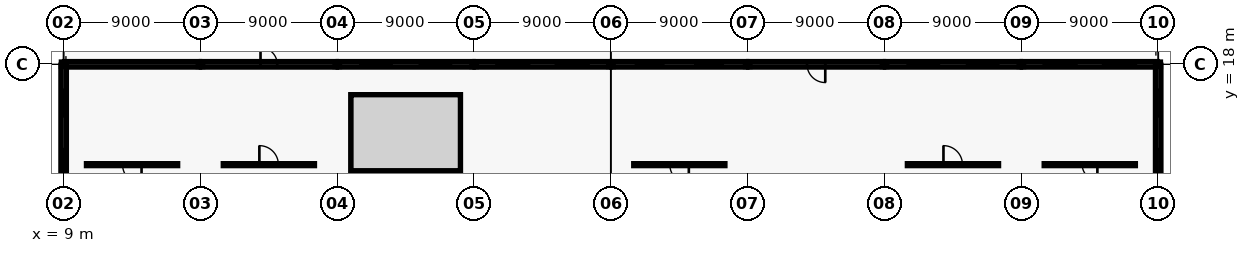
"""IFC4 building model, lengths in metres.
Left out: names, types, materials, properties, quantities, classifications, styles, units other than length and angle.
Written with IfcOpenShell. Run it as: python <this file> out.ifc"""

import sys

from ifc_helpers import new_model, si_unit, direction, frame, frame_2d, origin, origin_2d, place, context, subcontext, project, spatial, rectangle, i_section, extrude, element, fill, save


model = new_model("IFC4")
c1 = context("Model", 3, precision=1e-05, world=origin(), true_north=direction((0.0, 1.0)))
c2 = subcontext(c1, "Body", "Model", "MODEL_VIEW")
j1 = project(units=[si_unit("LENGTHUNIT", "METRE"), si_unit("PLANEANGLEUNIT", "RADIAN")], contexts=[c1])
p1 = place(None, origin())
s1 = spatial("IfcSite", under=j1, at=p1, CompositionType="ELEMENT")
p2 = place(p1, origin())
s2 = spatial("IfcBuilding", under=s1, at=p2, CompositionType="ELEMENT")
p3 = place(p2, frame((0.0, 0.0, 9.6)))
s3 = spatial("IfcBuildingStorey", under=s2, at=p3, CompositionType="ELEMENT", Elevation=9.6)
for number, where, z_axis, x_axis in (
    (1, (9.0, 18.0, 0.0), (0.0, 0.0, 1.0), (1.0, 0.0, 0.0)),
    (2, (18.0, 18.0, 0.0), (0.0, 0.0, 1.0), (1.0, 0.0, 0.0)),
    (3, (27.0, 18.0, 0.0), (0.0, 0.0, 1.0), (1.0, 0.0, 0.0)),
    (4, (36.0, 18.0, 0.0), (0.0, 0.0, 1.0), (1.0, 0.0, 0.0)),
    (5, (45.0, 18.0, 0.0), (0.0, 0.0, 1.0), (1.0, 0.0, 0.0)),
    (6, (54.0, 18.0, 0.0), (0.0, 0.0, 1.0), (1.0, 0.0, 0.0)),
    (7, (63.0, 18.0, 0.0), (0.0, 0.0, 1.0), (1.0, 0.0, 0.0)),
    (8, (72.0, 18.0, 0.0), (0.0, 0.0, 1.0), (1.0, 0.0, 0.0)),
    (9, (81.0, 18.0, 0.0), (0.0, 0.0, 1.0), (1.0, 0.0, 0.0)),
):
    element("IfcColumn", number, at=place(p3, frame(where, z_axis=z_axis, x_axis=x_axis)), inside=s3, PredefinedType="COLUMN", context=c2, shape_type="SweptSolid", body=[
        extrude(i_section(OverallWidth=0.3, OverallDepth=0.3, WebThickness=0.011, FlangeThickness=0.019, FilletRadius=0.027, at=origin_2d()), origin(), (0.0, 0.0, 1.0), 3.9),
    ])
p4 = place(p3, frame((9.06, 18.0, 0.0), z_axis=(0.0, 0.0, 1.0), x_axis=(1.0, 0.0, 0.0)))
e10 = element("IfcWall", 10, at=p4, inside=s3, PredefinedType="SOLIDWALL", context=c2, shape_type="SweptSolid", body=[
    extrude(rectangle(XDim=8.88, YDim=0.36, at=frame_2d((4.44, 0.0))), origin(), (0.0, 0.0, 1.0), 3.25),
])
p5 = place(p3, frame((18.06, 18.0, 0.0), z_axis=(0.0, 0.0, 1.0), x_axis=(1.0, 0.0, 0.0)))
e11 = element("IfcWall", 11, at=p5, inside=s3, PredefinedType="SOLIDWALL", context=c2, shape_type="SweptSolid", body=[
    extrude(rectangle(XDim=8.88, YDim=0.36, at=frame_2d((4.44, 0.0))), origin(), (0.0, 0.0, 1.0), 3.25),
])
p6 = place(p5, frame((3.89, 0.0, 0.0)))
e12 = element("IfcOpeningElement", 12, at=p6, cuts=e11, PredefinedType="OPENING", context=c2, shape_type="SweptSolid", body=[
    extrude(rectangle(XDim=1.1, YDim=2.15, at=frame_2d((0.55, 1.075))), frame((0.0, 0.19, 0.0), z_axis=(0.0, -1.0, 0.0), x_axis=(1.0, 0.0, 0.0)), (0.0, 0.0, 1.0), 0.38),
])
p7 = place(p3, frame((27.06, 18.0, 0.0), z_axis=(0.0, 0.0, 1.0), x_axis=(1.0, 0.0, 0.0)))
e13 = element("IfcWall", 13, at=p7, inside=s3, PredefinedType="SOLIDWALL", context=c2, shape_type="SweptSolid", body=[
    extrude(rectangle(XDim=8.88, YDim=0.36, at=frame_2d((4.44, 0.0))), origin(), (0.0, 0.0, 1.0), 3.25),
])
p8 = place(p7, frame((1.461, 0.0, 0.9)))
e14 = element("IfcOpeningElement", 14, at=p8, cuts=e13, PredefinedType="OPENING", context=c2, shape_type="SweptSolid", body=[
    extrude(rectangle(XDim=2.05, YDim=1.9, at=frame_2d((1.025, 0.95))), frame((0.0, 0.19, 0.0), z_axis=(0.0, -1.0, 0.0), x_axis=(1.0, 0.0, 0.0)), (0.0, 0.0, 1.0), 0.38),
])
p9 = place(p7, frame((5.369, 0.0, 0.9)))
e15 = element("IfcOpeningElement", 15, at=p9, cuts=e13, PredefinedType="OPENING", context=c2, shape_type="SweptSolid", body=[
    extrude(rectangle(XDim=2.05, YDim=1.9, at=frame_2d((1.025, 0.95))), frame((0.0, 0.19, 0.0), z_axis=(0.0, -1.0, 0.0), x_axis=(1.0, 0.0, 0.0)), (0.0, 0.0, 1.0), 0.38),
])
p10 = place(p3, frame((36.06, 18.0, 0.0), z_axis=(0.0, 0.0, 1.0), x_axis=(1.0, 0.0, 0.0)))
e16 = element("IfcWall", 16, at=p10, inside=s3, PredefinedType="SOLIDWALL", context=c2, shape_type="SweptSolid", body=[
    extrude(rectangle(XDim=8.88, YDim=0.36, at=frame_2d((4.44, 0.0))), origin(), (0.0, 0.0, 1.0), 3.25),
])
p11 = place(p10, frame((1.411, 0.0, 0.9)))
e17 = element("IfcOpeningElement", 17, at=p11, cuts=e16, PredefinedType="OPENING", context=c2, shape_type="SweptSolid", body=[
    extrude(rectangle(XDim=2.15, YDim=1.75, at=frame_2d((1.075, 0.875))), frame((0.0, 0.19, 0.0), z_axis=(0.0, -1.0, 0.0), x_axis=(1.0, 0.0, 0.0)), (0.0, 0.0, 1.0), 0.38),
])
p12 = place(p10, frame((5.319, 0.0, 0.9)))
e18 = element("IfcOpeningElement", 18, at=p12, cuts=e16, PredefinedType="OPENING", context=c2, shape_type="SweptSolid", body=[
    extrude(rectangle(XDim=2.15, YDim=1.75, at=frame_2d((1.075, 0.875))), frame((0.0, 0.19, 0.0), z_axis=(0.0, -1.0, 0.0), x_axis=(1.0, 0.0, 0.0)), (0.0, 0.0, 1.0), 0.38),
])
p13 = place(p3, frame((45.06, 18.0, 0.0), z_axis=(0.0, 0.0, 1.0), x_axis=(1.0, 0.0, 0.0)))
e19 = element("IfcWall", 19, at=p13, inside=s3, PredefinedType="SOLIDWALL", context=c2, shape_type="SweptSolid", body=[
    extrude(rectangle(XDim=8.88, YDim=0.36, at=frame_2d((4.44, 0.0))), origin(), (0.0, 0.0, 1.0), 3.25),
])
p14 = place(p13, frame((1.586, 0.0, 0.9)))
e20 = element("IfcOpeningElement", 20, at=p14, cuts=e19, PredefinedType="OPENING", context=c2, shape_type="SweptSolid", body=[
    extrude(rectangle(XDim=1.8, YDim=1.8, at=frame_2d((0.9, 0.9))), frame((0.0, 0.19, 0.0), z_axis=(0.0, -1.0, 0.0), x_axis=(1.0, 0.0, 0.0)), (0.0, 0.0, 1.0), 0.38),
])
p15 = place(p13, frame((5.494, 0.0, 0.9)))
e21 = element("IfcOpeningElement", 21, at=p15, cuts=e19, PredefinedType="OPENING", context=c2, shape_type="SweptSolid", body=[
    extrude(rectangle(XDim=1.8, YDim=1.8, at=frame_2d((0.9, 0.9))), frame((0.0, 0.19, 0.0), z_axis=(0.0, -1.0, 0.0), x_axis=(1.0, 0.0, 0.0)), (0.0, 0.0, 1.0), 0.38),
])
p16 = place(p3, frame((54.06, 18.0, 0.0), z_axis=(0.0, 0.0, 1.0), x_axis=(1.0, 0.0, 0.0)))
e22 = element("IfcWall", 22, at=p16, inside=s3, PredefinedType="SOLIDWALL", context=c2, shape_type="SweptSolid", body=[
    extrude(rectangle(XDim=8.88, YDim=0.36, at=frame_2d((4.44, 0.0))), origin(), (0.0, 0.0, 1.0), 3.25),
])
p17 = place(p16, frame((3.84, 0.0, 0.0)))
e23 = element("IfcOpeningElement", 23, at=p17, cuts=e22, PredefinedType="OPENING", context=c2, shape_type="SweptSolid", body=[
    extrude(rectangle(XDim=1.2, YDim=2.15, at=frame_2d((0.6, 1.075))), frame((0.0, 0.19, 0.0), z_axis=(0.0, -1.0, 0.0), x_axis=(1.0, 0.0, 0.0)), (0.0, 0.0, 1.0), 0.38),
])
p18 = place(p3, frame((63.06, 18.0, 0.0), z_axis=(0.0, 0.0, 1.0), x_axis=(1.0, 0.0, 0.0)))
e24 = element("IfcWall", 24, at=p18, inside=s3, PredefinedType="SOLIDWALL", context=c2, shape_type="SweptSolid", body=[
    extrude(rectangle(XDim=8.88, YDim=0.36, at=frame_2d((4.44, 0.0))), origin(), (0.0, 0.0, 1.0), 3.25),
])
p19 = place(p18, frame((1.461, 0.0, 0.9)))
e25 = element("IfcOpeningElement", 25, at=p19, cuts=e24, PredefinedType="OPENING", context=c2, shape_type="SweptSolid", body=[
    extrude(rectangle(XDim=2.05, YDim=1.9, at=frame_2d((1.025, 0.95))), frame((0.0, 0.19, 0.0), z_axis=(0.0, -1.0, 0.0), x_axis=(1.0, 0.0, 0.0)), (0.0, 0.0, 1.0), 0.38),
])
p20 = place(p18, frame((5.369, 0.0, 0.9)))
e26 = element("IfcOpeningElement", 26, at=p20, cuts=e24, PredefinedType="OPENING", context=c2, shape_type="SweptSolid", body=[
    extrude(rectangle(XDim=2.05, YDim=1.9, at=frame_2d((1.025, 0.95))), frame((0.0, 0.19, 0.0), z_axis=(0.0, -1.0, 0.0), x_axis=(1.0, 0.0, 0.0)), (0.0, 0.0, 1.0), 0.38),
])
p21 = place(p3, frame((72.06, 18.0, 0.0), z_axis=(0.0, 0.0, 1.0), x_axis=(1.0, 0.0, 0.0)))
e27 = element("IfcWall", 27, at=p21, inside=s3, PredefinedType="SOLIDWALL", context=c2, shape_type="SweptSolid", body=[
    extrude(rectangle(XDim=8.88, YDim=0.36, at=frame_2d((4.44, 0.0))), origin(), (0.0, 0.0, 1.0), 3.25),
])
p22 = place(p21, frame((1.411, 0.0, 0.9)))
e28 = element("IfcOpeningElement", 28, at=p22, cuts=e27, PredefinedType="OPENING", context=c2, shape_type="SweptSolid", body=[
    extrude(rectangle(XDim=2.15, YDim=1.75, at=frame_2d((1.075, 0.875))), frame((0.0, 0.19, 0.0), z_axis=(0.0, -1.0, 0.0), x_axis=(1.0, 0.0, 0.0)), (0.0, 0.0, 1.0), 0.38),
])
p23 = place(p21, frame((5.319, 0.0, 0.9)))
e29 = element("IfcOpeningElement", 29, at=p23, cuts=e27, PredefinedType="OPENING", context=c2, shape_type="SweptSolid", body=[
    extrude(rectangle(XDim=2.15, YDim=1.75, at=frame_2d((1.075, 0.875))), frame((0.0, 0.19, 0.0), z_axis=(0.0, -1.0, 0.0), x_axis=(1.0, 0.0, 0.0)), (0.0, 0.0, 1.0), 0.38),
])
p24 = place(p3, frame((9.0, 9.06, 0.0), z_axis=(0.0, 0.0, 1.0), x_axis=(0.0, 1.0, 0.0)))
e30 = element("IfcWall", 30, at=p24, inside=s3, PredefinedType="SOLIDWALL", context=c2, shape_type="SweptSolid", body=[
    extrude(rectangle(XDim=8.88, YDim=0.36, at=frame_2d((4.44, 0.0))), origin(), (0.0, 0.0, 1.0), 3.25),
])
p25 = place(p24, frame((1.611, 0.0, 0.9)))
e31 = element("IfcOpeningElement", 31, at=p25, cuts=e30, PredefinedType="OPENING", context=c2, shape_type="SweptSolid", body=[
    extrude(rectangle(XDim=1.75, YDim=2.25, at=frame_2d((0.875, 1.125))), frame((0.0, 0.19, 0.0), z_axis=(0.0, -1.0, 0.0), x_axis=(1.0, 0.0, 0.0)), (0.0, 0.0, 1.0), 0.38),
])
p26 = place(p24, frame((5.519, 0.0, 0.9)))
e32 = element("IfcOpeningElement", 32, at=p26, cuts=e30, PredefinedType="OPENING", context=c2, shape_type="SweptSolid", body=[
    extrude(rectangle(XDim=1.75, YDim=2.25, at=frame_2d((0.875, 1.125))), frame((0.0, 0.19, 0.0), z_axis=(0.0, -1.0, 0.0), x_axis=(1.0, 0.0, 0.0)), (0.0, 0.0, 1.0), 0.38),
])
p27 = place(p3, frame((81.0, 9.06, 0.0), z_axis=(0.0, 0.0, 1.0), x_axis=(0.0, 1.0, 0.0)))
e33 = element("IfcWall", 33, at=p27, inside=s3, PredefinedType="SOLIDWALL", context=c2, shape_type="SweptSolid", body=[
    extrude(rectangle(XDim=8.88, YDim=0.36, at=frame_2d((4.44, 0.0))), origin(), (0.0, 0.0, 1.0), 3.25),
])
p28 = place(p27, frame((1.611, 0.0, 0.9)))
e34 = element("IfcOpeningElement", 34, at=p28, cuts=e33, PredefinedType="OPENING", context=c2, shape_type="SweptSolid", body=[
    extrude(rectangle(XDim=1.75, YDim=2.25, at=frame_2d((0.875, 1.125))), frame((0.0, 0.19, 0.0), z_axis=(0.0, -1.0, 0.0), x_axis=(1.0, 0.0, 0.0)), (0.0, 0.0, 1.0), 0.38),
])
p29 = place(p27, frame((5.519, 0.0, 0.9)))
e35 = element("IfcOpeningElement", 35, at=p29, cuts=e33, PredefinedType="OPENING", context=c2, shape_type="SweptSolid", body=[
    extrude(rectangle(XDim=1.75, YDim=2.25, at=frame_2d((0.875, 1.125))), frame((0.0, 0.19, 0.0), z_axis=(0.0, -1.0, 0.0), x_axis=(1.0, 0.0, 0.0)), (0.0, 0.0, 1.0), 0.38),
])
p30 = place(p3, frame((10.5, 11.4, 0.0), z_axis=(0.0, 0.0, 1.0), x_axis=(1.0, 0.0, 0.0)))
e36 = element("IfcWall", 36, at=p30, inside=s3, PredefinedType="PARTITIONING", context=c2, shape_type="SweptSolid", body=[
    extrude(rectangle(XDim=6.0, YDim=0.13, at=frame_2d((3.0, 0.0))), origin(), (0.0, 0.0, 1.0), 2.9),
])
p31 = place(p30, frame((2.375, 0.0, 0.0)))
e37 = element("IfcOpeningElement", 37, at=p31, cuts=e36, PredefinedType="OPENING", context=c2, shape_type="SweptSolid", body=[
    extrude(rectangle(XDim=1.25, YDim=2.15, at=frame_2d((0.625, 1.075))), frame((0.0, 0.075, 0.0), z_axis=(0.0, -1.0, 0.0), x_axis=(1.0, 0.0, 0.0)), (0.0, 0.0, 1.0), 0.15),
])
p32 = place(p3, frame((19.5, 11.4, 0.0), z_axis=(0.0, 0.0, 1.0), x_axis=(1.0, 0.0, 0.0)))
e38 = element("IfcWall", 38, at=p32, inside=s3, PredefinedType="PARTITIONING", context=c2, shape_type="SweptSolid", body=[
    extrude(rectangle(XDim=6.0, YDim=0.13, at=frame_2d((3.0, 0.0))), origin(), (0.0, 0.0, 1.0), 2.9),
])
p33 = place(p32, frame((2.375, 0.0, 0.0)))
e39 = element("IfcOpeningElement", 39, at=p33, cuts=e38, PredefinedType="OPENING", context=c2, shape_type="SweptSolid", body=[
    extrude(rectangle(XDim=1.25, YDim=2.15, at=frame_2d((0.625, 1.075))), frame((0.0, 0.075, 0.0), z_axis=(0.0, -1.0, 0.0), x_axis=(1.0, 0.0, 0.0)), (0.0, 0.0, 1.0), 0.15),
])
p34 = place(p3, frame((46.5, 11.4, 0.0), z_axis=(0.0, 0.0, 1.0), x_axis=(1.0, 0.0, 0.0)))
e40 = element("IfcWall", 40, at=p34, inside=s3, PredefinedType="PARTITIONING", context=c2, shape_type="SweptSolid", body=[
    extrude(rectangle(XDim=6.0, YDim=0.13, at=frame_2d((3.0, 0.0))), origin(), (0.0, 0.0, 1.0), 2.9),
])
p35 = place(p34, frame((2.375, 0.0, 0.0)))
e41 = element("IfcOpeningElement", 41, at=p35, cuts=e40, PredefinedType="OPENING", context=c2, shape_type="SweptSolid", body=[
    extrude(rectangle(XDim=1.25, YDim=2.15, at=frame_2d((0.625, 1.075))), frame((0.0, 0.075, 0.0), z_axis=(0.0, -1.0, 0.0), x_axis=(1.0, 0.0, 0.0)), (0.0, 0.0, 1.0), 0.15),
])
p36 = place(p3, frame((64.5, 11.4, 0.0), z_axis=(0.0, 0.0, 1.0), x_axis=(1.0, 0.0, 0.0)))
e42 = element("IfcWall", 42, at=p36, inside=s3, PredefinedType="PARTITIONING", context=c2, shape_type="SweptSolid", body=[
    extrude(rectangle(XDim=6.0, YDim=0.13, at=frame_2d((3.0, 0.0))), origin(), (0.0, 0.0, 1.0), 2.9),
])
p37 = place(p36, frame((2.375, 0.0, 0.0)))
e43 = element("IfcOpeningElement", 43, at=p37, cuts=e42, PredefinedType="OPENING", context=c2, shape_type="SweptSolid", body=[
    extrude(rectangle(XDim=1.25, YDim=2.15, at=frame_2d((0.625, 1.075))), frame((0.0, 0.075, 0.0), z_axis=(0.0, -1.0, 0.0), x_axis=(1.0, 0.0, 0.0)), (0.0, 0.0, 1.0), 0.15),
])
p38 = place(p3, frame((73.5, 11.4, 0.0), z_axis=(0.0, 0.0, 1.0), x_axis=(1.0, 0.0, 0.0)))
e44 = element("IfcWall", 44, at=p38, inside=s3, PredefinedType="PARTITIONING", context=c2, shape_type="SweptSolid", body=[
    extrude(rectangle(XDim=6.0, YDim=0.13, at=frame_2d((3.0, 0.0))), origin(), (0.0, 0.0, 1.0), 2.9),
])
p39 = place(p38, frame((2.5, 0.0, 0.0)))
e45 = element("IfcOpeningElement", 45, at=p39, cuts=e44, PredefinedType="OPENING", context=c2, shape_type="SweptSolid", body=[
    extrude(rectangle(XDim=1.0, YDim=2.1, at=frame_2d((0.5, 1.05))), frame((0.0, 0.075, 0.0), z_axis=(0.0, -1.0, 0.0), x_axis=(1.0, 0.0, 0.0)), (0.0, 0.0, 1.0), 0.15),
])
p40 = place(p6, origin())
e46 = element("IfcDoor", 46, at=p40, inside=s3, OperationType="SINGLE_SWING_LEFT", PredefinedType="DOOR", context=c2, shape_type="SweptSolid", body=[
    extrude(rectangle(XDim=1.1, YDim=2.15, at=frame_2d((0.55, 1.075))), frame((0.0, 0.025, 0.0), z_axis=(0.0, -1.0, 0.0), x_axis=(1.0, 0.0, 0.0)), (0.0, 0.0, 1.0), 0.05),
])
fill(e12, e46)
p41 = place(p8, origin())
e47 = element("IfcWindow", 47, at=p41, inside=s3, PartitioningType="SINGLE_PANEL", PredefinedType="WINDOW", context=c2, shape_type="SweptSolid", body=[
    extrude(rectangle(XDim=2.05, YDim=1.9, at=frame_2d((1.025, 0.95))), frame((0.0, 0.03, 0.0), z_axis=(0.0, -1.0, 0.0), x_axis=(1.0, 0.0, 0.0)), (0.0, 0.0, 1.0), 0.06),
])
fill(e14, e47)
p42 = place(p9, origin())
e48 = element("IfcWindow", 48, at=p42, inside=s3, PartitioningType="SINGLE_PANEL", PredefinedType="WINDOW", context=c2, shape_type="SweptSolid", body=[
    extrude(rectangle(XDim=2.05, YDim=1.9, at=frame_2d((1.025, 0.95))), frame((0.0, 0.03, 0.0), z_axis=(0.0, -1.0, 0.0), x_axis=(1.0, 0.0, 0.0)), (0.0, 0.0, 1.0), 0.06),
])
fill(e15, e48)
p43 = place(p11, origin())
e49 = element("IfcWindow", 49, at=p43, inside=s3, PartitioningType="SINGLE_PANEL", PredefinedType="WINDOW", context=c2, shape_type="SweptSolid", body=[
    extrude(rectangle(XDim=2.15, YDim=1.75, at=frame_2d((1.075, 0.875))), frame((0.0, 0.03, 0.0), z_axis=(0.0, -1.0, 0.0), x_axis=(1.0, 0.0, 0.0)), (0.0, 0.0, 1.0), 0.06),
])
fill(e17, e49)
p44 = place(p12, origin())
e50 = element("IfcWindow", 50, at=p44, inside=s3, PartitioningType="SINGLE_PANEL", PredefinedType="WINDOW", context=c2, shape_type="SweptSolid", body=[
    extrude(rectangle(XDim=2.15, YDim=1.75, at=frame_2d((1.075, 0.875))), frame((0.0, 0.03, 0.0), z_axis=(0.0, -1.0, 0.0), x_axis=(1.0, 0.0, 0.0)), (0.0, 0.0, 1.0), 0.06),
])
fill(e18, e50)
p45 = place(p14, origin())
e51 = element("IfcWindow", 51, at=p45, inside=s3, PartitioningType="SINGLE_PANEL", PredefinedType="WINDOW", context=c2, shape_type="SweptSolid", body=[
    extrude(rectangle(XDim=1.8, YDim=1.8, at=frame_2d((0.9, 0.9))), frame((0.0, 0.03, 0.0), z_axis=(0.0, -1.0, 0.0), x_axis=(1.0, 0.0, 0.0)), (0.0, 0.0, 1.0), 0.06),
])
fill(e20, e51)
p46 = place(p15, origin())
e52 = element("IfcWindow", 52, at=p46, inside=s3, PartitioningType="SINGLE_PANEL", PredefinedType="WINDOW", context=c2, shape_type="SweptSolid", body=[
    extrude(rectangle(XDim=1.8, YDim=1.8, at=frame_2d((0.9, 0.9))), frame((0.0, 0.03, 0.0), z_axis=(0.0, -1.0, 0.0), x_axis=(1.0, 0.0, 0.0)), (0.0, 0.0, 1.0), 0.06),
])
fill(e21, e52)
p47 = place(p17, origin())
e53 = element("IfcDoor", 53, at=p47, inside=s3, OperationType="SINGLE_SWING_RIGHT", PredefinedType="DOOR", context=c2, shape_type="SweptSolid", body=[
    extrude(rectangle(XDim=1.2, YDim=2.15, at=frame_2d((0.6, 1.075))), frame((0.0, 0.025, 0.0), z_axis=(0.0, -1.0, 0.0), x_axis=(1.0, 0.0, 0.0)), (0.0, 0.0, 1.0), 0.05),
])
fill(e23, e53)
p48 = place(p19, origin())
e54 = element("IfcWindow", 54, at=p48, inside=s3, PartitioningType="SINGLE_PANEL", PredefinedType="WINDOW", context=c2, shape_type="SweptSolid", body=[
    extrude(rectangle(XDim=2.05, YDim=1.9, at=frame_2d((1.025, 0.95))), frame((0.0, 0.03, 0.0), z_axis=(0.0, -1.0, 0.0), x_axis=(1.0, 0.0, 0.0)), (0.0, 0.0, 1.0), 0.06),
])
fill(e25, e54)
p49 = place(p20, origin())
e55 = element("IfcWindow", 55, at=p49, inside=s3, PartitioningType="SINGLE_PANEL", PredefinedType="WINDOW", context=c2, shape_type="SweptSolid", body=[
    extrude(rectangle(XDim=2.05, YDim=1.9, at=frame_2d((1.025, 0.95))), frame((0.0, 0.03, 0.0), z_axis=(0.0, -1.0, 0.0), x_axis=(1.0, 0.0, 0.0)), (0.0, 0.0, 1.0), 0.06),
])
fill(e26, e55)
p50 = place(p22, origin())
e56 = element("IfcWindow", 56, at=p50, inside=s3, PartitioningType="SINGLE_PANEL", PredefinedType="WINDOW", context=c2, shape_type="SweptSolid", body=[
    extrude(rectangle(XDim=2.15, YDim=1.75, at=frame_2d((1.075, 0.875))), frame((0.0, 0.03, 0.0), z_axis=(0.0, -1.0, 0.0), x_axis=(1.0, 0.0, 0.0)), (0.0, 0.0, 1.0), 0.06),
])
fill(e28, e56)
p51 = place(p23, origin())
e57 = element("IfcWindow", 57, at=p51, inside=s3, PartitioningType="SINGLE_PANEL", PredefinedType="WINDOW", context=c2, shape_type="SweptSolid", body=[
    extrude(rectangle(XDim=2.15, YDim=1.75, at=frame_2d((1.075, 0.875))), frame((0.0, 0.03, 0.0), z_axis=(0.0, -1.0, 0.0), x_axis=(1.0, 0.0, 0.0)), (0.0, 0.0, 1.0), 0.06),
])
fill(e29, e57)
p52 = place(p25, origin())
e58 = element("IfcWindow", 58, at=p52, inside=s3, PartitioningType="SINGLE_PANEL", PredefinedType="WINDOW", context=c2, shape_type="SweptSolid", body=[
    extrude(rectangle(XDim=1.75, YDim=2.25, at=frame_2d((0.875, 1.125))), frame((0.0, 0.03, 0.0), z_axis=(0.0, -1.0, 0.0), x_axis=(1.0, 0.0, 0.0)), (0.0, 0.0, 1.0), 0.06),
])
fill(e31, e58)
p53 = place(p26, origin())
e59 = element("IfcWindow", 59, at=p53, inside=s3, PartitioningType="SINGLE_PANEL", PredefinedType="WINDOW", context=c2, shape_type="SweptSolid", body=[
    extrude(rectangle(XDim=1.75, YDim=2.25, at=frame_2d((0.875, 1.125))), frame((0.0, 0.03, 0.0), z_axis=(0.0, -1.0, 0.0), x_axis=(1.0, 0.0, 0.0)), (0.0, 0.0, 1.0), 0.06),
])
fill(e32, e59)
p54 = place(p28, origin())
e60 = element("IfcWindow", 60, at=p54, inside=s3, PartitioningType="SINGLE_PANEL", PredefinedType="WINDOW", context=c2, shape_type="SweptSolid", body=[
    extrude(rectangle(XDim=1.75, YDim=2.25, at=frame_2d((0.875, 1.125))), frame((0.0, 0.03, 0.0), z_axis=(0.0, -1.0, 0.0), x_axis=(1.0, 0.0, 0.0)), (0.0, 0.0, 1.0), 0.06),
])
fill(e34, e60)
p55 = place(p29, origin())
e61 = element("IfcWindow", 61, at=p55, inside=s3, PartitioningType="SINGLE_PANEL", PredefinedType="WINDOW", context=c2, shape_type="SweptSolid", body=[
    extrude(rectangle(XDim=1.75, YDim=2.25, at=frame_2d((0.875, 1.125))), frame((0.0, 0.03, 0.0), z_axis=(0.0, -1.0, 0.0), x_axis=(1.0, 0.0, 0.0)), (0.0, 0.0, 1.0), 0.06),
])
fill(e35, e61)
p56 = place(p31, origin())
e62 = element("IfcDoor", 62, at=p56, inside=s3, OperationType="SINGLE_SWING_RIGHT", PredefinedType="DOOR", context=c2, shape_type="SweptSolid", body=[
    extrude(rectangle(XDim=1.25, YDim=2.15, at=frame_2d((0.625, 1.075))), frame((0.0, 0.025, 0.0), z_axis=(0.0, -1.0, 0.0), x_axis=(1.0, 0.0, 0.0)), (0.0, 0.0, 1.0), 0.05),
])
fill(e37, e62)
p57 = place(p33, origin())
e63 = element("IfcDoor", 63, at=p57, inside=s3, OperationType="SINGLE_SWING_LEFT", PredefinedType="DOOR", context=c2, shape_type="SweptSolid", body=[
    extrude(rectangle(XDim=1.25, YDim=2.15, at=frame_2d((0.625, 1.075))), frame((0.0, 0.025, 0.0), z_axis=(0.0, -1.0, 0.0), x_axis=(1.0, 0.0, 0.0)), (0.0, 0.0, 1.0), 0.05),
])
fill(e39, e63)
p58 = place(p35, origin())
e64 = element("IfcDoor", 64, at=p58, inside=s3, OperationType="SINGLE_SWING_RIGHT", PredefinedType="DOOR", context=c2, shape_type="SweptSolid", body=[
    extrude(rectangle(XDim=1.25, YDim=2.15, at=frame_2d((0.625, 1.075))), frame((0.0, 0.025, 0.0), z_axis=(0.0, -1.0, 0.0), x_axis=(1.0, 0.0, 0.0)), (0.0, 0.0, 1.0), 0.05),
])
fill(e41, e64)
p59 = place(p37, origin())
e65 = element("IfcDoor", 65, at=p59, inside=s3, OperationType="SINGLE_SWING_LEFT", PredefinedType="DOOR", context=c2, shape_type="SweptSolid", body=[
    extrude(rectangle(XDim=1.25, YDim=2.15, at=frame_2d((0.625, 1.075))), frame((0.0, 0.025, 0.0), z_axis=(0.0, -1.0, 0.0), x_axis=(1.0, 0.0, 0.0)), (0.0, 0.0, 1.0), 0.05),
])
fill(e43, e65)
p60 = place(p39, origin())
e66 = element("IfcDoor", 66, at=p60, inside=s3, OperationType="SINGLE_SWING_RIGHT", PredefinedType="DOOR", context=c2, shape_type="SweptSolid", body=[
    extrude(rectangle(XDim=1.0, YDim=2.1, at=frame_2d((0.5, 1.05))), frame((0.0, 0.025, 0.0), z_axis=(0.0, -1.0, 0.0), x_axis=(1.0, 0.0, 0.0)), (0.0, 0.0, 1.0), 0.05),
])
fill(e45, e66)
save(model, sys.argv[1])
